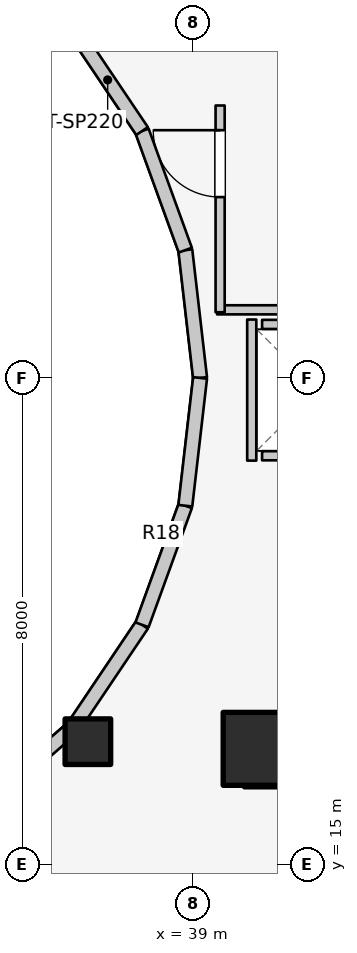
"""IFC4 building model, lengths in metres.
Left out: names, types, materials, properties, quantities, classifications, styles, units other than length and angle.
Written with IfcOpenShell. Run it as: python <this file> out.ifc"""

import sys

from ifc_helpers import new_model, si_unit, direction, frame, frame_2d, origin, origin_2d, place, context, subcontext, project, spatial, rectangle, extrude, element, fill, save


model = new_model("IFC4")
c1 = context("Model", 3, precision=1e-05, world=origin(), true_north=direction((0.0, 1.0)))
c2 = subcontext(c1, "Body", "Model", "MODEL_VIEW")
j1 = project(units=[si_unit("LENGTHUNIT", "METRE"), si_unit("PLANEANGLEUNIT", "RADIAN")], contexts=[c1])
p1 = place(None, origin())
s1 = spatial("IfcSite", under=j1, at=p1, CompositionType="ELEMENT")
p2 = place(p1, origin())
s2 = spatial("IfcBuilding", under=s1, at=p2, CompositionType="ELEMENT")
p3 = place(p2, frame((0.0, 0.0, 190.1)))
s3 = spatial("IfcBuildingStorey", under=s2, at=p3, CompositionType="ELEMENT", Elevation=190.1)
p4 = place(p3, frame((39.85, 16.55, 0.0), z_axis=(0.0, 0.0, 1.0), x_axis=(1.0, 0.0, 0.0)))
e1 = element("IfcWall", 1, at=p4, inside=s3, PredefinedType="SHEAR", context=c2, shape_type="SweptSolid", body=[
    extrude(rectangle(XDim=4.5, YDim=0.55, at=frame_2d((2.25, 0.0))), origin(), (0.0, 0.0, 1.0), 3.1),
])
p5 = place(p3, frame((40.1, 16.9, 0.0), z_axis=(0.0, 0.0, 1.0), x_axis=(1.0, 0.0, 0.0)))
e2 = element("IfcColumn", 2, at=p5, inside=s3, PredefinedType="COLUMN", context=c2, shape_type="SweptSolid", body=[
    extrude(rectangle(XDim=1.2, YDim=1.2, at=origin_2d()), origin(), (0.0, 0.0, 1.0), 3.1),
])
p6 = place(p3, frame((37.275, 17.018, 0.0), z_axis=(0.0, 0.0, 1.0), x_axis=(1.0, 0.0, 0.0)))
e3 = element("IfcColumn", 3, at=p6, inside=s3, PredefinedType="COLUMN", context=c2, shape_type="SweptSolid", body=[
    extrude(rectangle(XDim=0.75, YDim=0.75, at=origin_2d()), origin(), (0.0, 0.0, 1.0), 3.1),
])
p7 = place(p3, frame((39.12, 23.0, 0.0), z_axis=(0.0, 0.0, 1.0), x_axis=(-0.114711713601, 0.993398823617, 0.0)))
e4 = element("IfcWall", 4, at=p7, inside=s3, PredefinedType="STANDARD", context=c2, shape_type="SweptSolid", body=[
    extrude(rectangle(XDim=2.115, YDim=0.23, at=frame_2d((1.058, 0.0))), origin(), (0.0, 0.0, 1.0), 2.56),
])
p8 = place(p3, frame((38.877, 25.102, 0.0), z_axis=(0.0, 0.0, 1.0), x_axis=(-0.341423187295, 0.93990968033, 0.0)))
e5 = element("IfcWall", 5, at=p8, inside=s3, PredefinedType="STANDARD", context=c2, shape_type="SweptSolid", body=[
    extrude(rectangle(XDim=2.084, YDim=0.23, at=frame_2d((1.042, 0.0))), origin(), (0.0, 0.0, 1.0), 2.56),
])
p9 = place(p3, frame((38.166, 27.06, 0.0), z_axis=(0.0, 0.0, 1.0), x_axis=(-0.558197800898, 0.829707909492, 0.0)))
e6 = element("IfcWall", 6, at=p9, inside=s3, PredefinedType="STANDARD", context=c2, shape_type="SweptSolid", body=[
    extrude(rectangle(XDim=2.027, YDim=0.23, at=frame_2d((1.013, 0.0))), origin(), (0.0, 0.0, 1.0), 1.22),
])
p10 = place(p3, frame((35.56, 15.968, 0.0), z_axis=(0.0, 0.0, 1.0), x_axis=(0.752576694707, 0.658504607869, 0.0)))
e7 = element("IfcWall", 7, at=p10, inside=s3, PredefinedType="STANDARD", context=c2, shape_type="SweptSolid", body=[
    extrude(rectangle(XDim=1.959, YDim=0.23, at=frame_2d((0.98, 0.0))), origin(), (0.0, 0.0, 1.0), 1.22),
])
p11 = place(p3, frame((37.035, 17.258, 0.0), z_axis=(0.0, 0.0, 1.0), x_axis=(0.558197800898, 0.829707909492, 0.0)))
e8 = element("IfcWall", 8, at=p11, inside=s3, PredefinedType="STANDARD", context=c2, shape_type="SweptSolid", body=[
    extrude(rectangle(XDim=2.027, YDim=0.23, at=frame_2d((1.013, 0.0))), origin(), (0.0, 0.0, 1.0), 1.22),
])
p12 = place(p3, frame((38.166, 18.94, 0.0), z_axis=(0.0, 0.0, 1.0), x_axis=(0.341423187295, 0.93990968033, 0.0)))
e9 = element("IfcWall", 9, at=p12, inside=s3, PredefinedType="STANDARD", context=c2, shape_type="SweptSolid", body=[
    extrude(rectangle(XDim=2.084, YDim=0.23, at=frame_2d((1.042, 0.0))), origin(), (0.0, 0.0, 1.0), 2.56),
])
p13 = place(p3, frame((38.877, 20.898, 0.0), z_axis=(0.0, 0.0, 1.0), x_axis=(0.114711713601, 0.993398823617, 0.0)))
e10 = element("IfcWall", 10, at=p13, inside=s3, PredefinedType="STANDARD", context=c2, shape_type="SweptSolid", body=[
    extrude(rectangle(XDim=2.115, YDim=0.23, at=frame_2d((1.058, 0.0))), origin(), (0.0, 0.0, 1.0), 2.56),
])
for number, where, z_axis, x_axis in (
    (11, (40.14, 21.72, 0.0), (0.0, 0.0, 1.0), (1.0, 0.0, 0.0)),
    (12, (40.14, 23.88, 0.0), (0.0, 0.0, 1.0), (1.0, 0.0, 0.0)),
):
    element("IfcWall", number, at=place(p3, frame(where, z_axis=z_axis, x_axis=x_axis)), inside=s3, PredefinedType="SOLIDWALL", context=c2, shape_type="SweptSolid", body=[
        extrude(rectangle(XDim=1.82, YDim=0.15, at=frame_2d((0.91, 0.0))), origin(), (0.0, 0.0, 1.0), 2.12),
    ])
p14 = place(p3, frame((39.97, 21.64, 0.0), z_axis=(0.0, 0.0, 1.0), x_axis=(0.0, 1.0, 0.0)))
e13 = element("IfcWall", 13, at=p14, inside=s3, PredefinedType="SOLIDWALL", context=c2, shape_type="SweptSolid", body=[
    extrude(rectangle(XDim=2.32, YDim=0.15, at=frame_2d((1.16, 0.0))), origin(), (0.0, 0.0, 1.0), 2.12),
])
p15 = place(p3, frame((39.4, 24.12, 0.0), z_axis=(0.0, 0.0, 1.0), x_axis=(1.0, 0.0, 0.0)))
e14 = element("IfcWall", 14, at=p15, inside=s3, PredefinedType="PARTITIONING", context=c2, shape_type="SweptSolid", body=[
    extrude(rectangle(XDim=5.08, YDim=0.15, at=frame_2d((2.54, 0.0))), origin(), (0.0, 0.0, 1.0), 2.12),
])
p16 = place(p3, frame((39.45, 24.08, 0.0), z_axis=(0.0, 0.0, 1.0), x_axis=(0.0, 1.0, 0.0)))
e15 = element("IfcWall", 15, at=p16, inside=s3, PredefinedType="PARTITIONING", context=c2, shape_type="SweptSolid", body=[
    extrude(rectangle(XDim=3.4, YDim=0.15, at=frame_2d((1.7, 0.0))), origin(), (0.0, 0.0, 1.0), 2.575),
])
p17 = place(p16, frame((1.894, 0.0, 0.0)))
e16 = element("IfcOpeningElement", 16, at=p17, cuts=e15, PredefinedType="OPENING", context=c2, shape_type="SweptSolid", body=[
    extrude(rectangle(XDim=1.1, YDim=2.1, at=frame_2d((0.55, 1.05))), frame((0.0, 0.085, 0.0), z_axis=(0.0, -1.0, 0.0), x_axis=(1.0, 0.0, 0.0)), (0.0, 0.0, 1.0), 0.17),
])
p18 = place(p3, frame((35.55, 15.985, 0.0), z_axis=(0.0, 0.0, 1.0), x_axis=(0.525627246902, -0.850714991824, 0.0)))
e17 = element("IfcWall", 17, at=p18, inside=s3, PredefinedType="PARTITIONING", context=c2, shape_type="SweptSolid", body=[
    extrude(rectangle(XDim=2.901, YDim=0.125, at=frame_2d((1.451, 0.0))), origin(), (0.0, 0.0, 1.0), 1.22),
])
p19 = place(p17, origin())
e18 = element("IfcDoor", 18, at=p19, inside=s3, OperationType="SINGLE_SWING_RIGHT", PredefinedType="DOOR", context=c2, shape_type="SweptSolid", body=[
    extrude(rectangle(XDim=1.1, YDim=2.1, at=frame_2d((0.55, 1.05))), frame((0.0, 0.025, 0.0), z_axis=(0.0, -1.0, 0.0), x_axis=(1.0, 0.0, 0.0)), (0.0, 0.0, 1.0), 0.05),
])
fill(e16, e18)
save(model, sys.argv[1])
